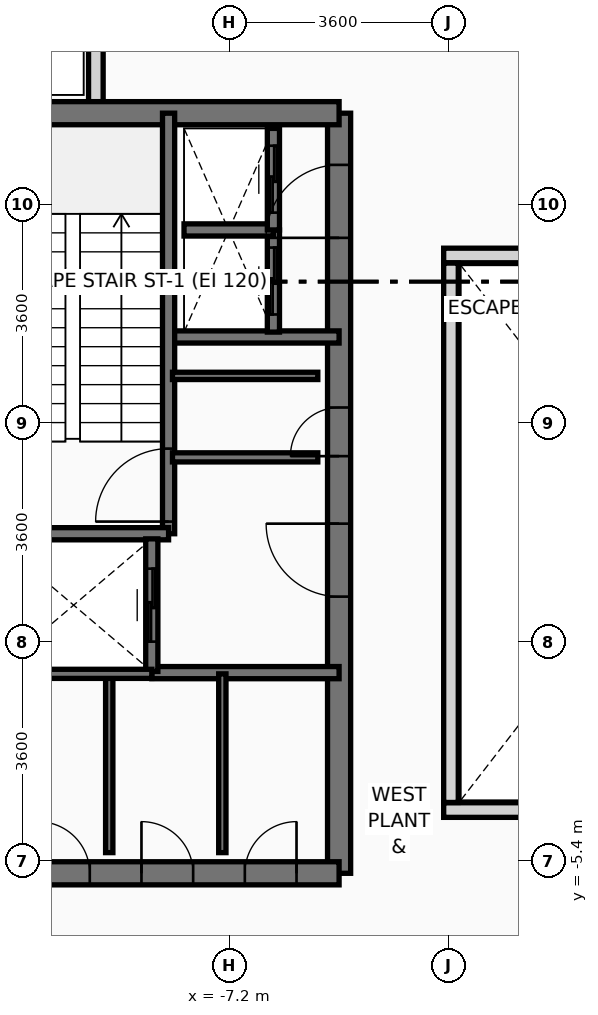
"""IFC4 building model, lengths in metres.
Left out: names, types, materials, properties, quantities, classifications, styles, units other than length and angle.
Written with IfcOpenShell. Run it as: python <this file> out.ifc"""

import sys

from ifc_helpers import new_model, si_unit, direction, frame, frame_2d, origin, place, context, subcontext, project, spatial, rectangle, extrude, source, transform, mapped, element, fill, save


model = new_model("IFC4")
c1 = context("Model", 3, precision=1e-05, world=origin(), true_north=direction((0.0, 1.0)))
c2 = subcontext(c1, "Body", "Model", "MODEL_VIEW")
j1 = project(units=[si_unit("LENGTHUNIT", "METRE"), si_unit("PLANEANGLEUNIT", "RADIAN")], contexts=[c1])
p1 = place(None, origin())
s1 = spatial("IfcSite", under=j1, at=p1, CompositionType="ELEMENT")
p2 = place(p1, origin())
s2 = spatial("IfcBuilding", under=s1, at=p2, CompositionType="ELEMENT")
p3 = place(p2, frame((0.0, 0.0, 214.8)))
s3 = spatial("IfcBuildingStorey", under=s2, at=p3, CompositionType="ELEMENT", Elevation=214.8)
p4 = place(p3, frame((-9.4, 6.953, 0.0), z_axis=(0.0, 0.0, 1.0), x_axis=(0.0, 1.0, 0.0)))
e1 = element("IfcWall", 1, at=p4, inside=s3, PredefinedType="PARAPET", context=c2, shape_type="SweptSolid", body=[
    extrude(rectangle(XDim=1.594, YDim=0.24, at=frame_2d((0.797, 0.0))), origin(), (0.0, 0.0, 1.0), 1.15),
])
p5 = place(p3, frame((-5.4, -5.6, 0.0), z_axis=(0.0, 0.0, 1.0), x_axis=(0.0, 1.0, 0.0)))
e2 = element("IfcWall", 2, at=p5, inside=s3, PredefinedType="SHEAR", context=c2, shape_type="SweptSolid", body=[
    extrude(rectangle(XDim=12.5, YDim=0.38, at=frame_2d((6.25, 0.0))), origin(), (0.0, 0.0, 1.0), 4.41),
])
p6 = place(p5, frame((4.55, 0.0, 0.0)))
e3 = element("IfcOpeningElement", 3, at=p6, cuts=e2, PredefinedType="OPENING", context=c2, shape_type="SweptSolid", body=[
    extrude(rectangle(XDim=1.2, YDim=2.2, at=frame_2d((0.6, 1.1))), frame((0.0, 0.2, 0.0), z_axis=(0.0, -1.0, 0.0), x_axis=(1.0, 0.0, 0.0)), (0.0, 0.0, 1.0), 0.4),
])
p7 = place(p5, frame((10.45, 0.0, 0.0)))
e4 = element("IfcOpeningElement", 4, at=p7, cuts=e2, PredefinedType="OPENING", context=c2, shape_type="SweptSolid", body=[
    extrude(rectangle(XDim=1.2, YDim=2.2, at=frame_2d((0.6, 1.1))), frame((0.0, 0.2, 0.0), z_axis=(0.0, -1.0, 0.0), x_axis=(1.0, 0.0, 0.0)), (0.0, 0.0, 1.0), 0.4),
])
p8 = place(p5, frame((6.86, 0.0, 0.0)))
e5 = element("IfcOpeningElement", 5, at=p8, cuts=e2, PredefinedType="OPENING", context=c2, shape_type="SweptSolid", body=[
    extrude(rectangle(XDim=0.8, YDim=2.1, at=frame_2d((0.4, 1.05))), frame((0.0, 0.2, 0.0), z_axis=(0.0, -1.0, 0.0), x_axis=(1.0, 0.0, 0.0)), (0.0, 0.0, 1.0), 0.4),
])
p9 = place(p3, frame((-11.356, 6.9, 0.0), z_axis=(0.0, 0.0, 1.0), x_axis=(1.0, 0.0, 0.0)))
e6 = element("IfcWall", 6, at=p9, inside=s3, PredefinedType="SHEAR", context=c2, shape_type="SweptSolid", body=[
    extrude(rectangle(XDim=5.956, YDim=0.38, at=frame_2d((2.978, 0.0))), origin(), (0.0, 0.0, 1.0), 4.41),
])
p10 = place(p3, frame((-13.2, -5.6, 0.0), z_axis=(0.0, 0.0, 1.0), x_axis=(1.0, 0.0, 0.0)))
e7 = element("IfcWall", 7, at=p10, inside=s3, PredefinedType="SHEAR", context=c2, shape_type="SweptSolid", body=[
    extrude(rectangle(XDim=7.8, YDim=0.38, at=frame_2d((3.9, 0.0))), origin(), (0.0, 0.0, 1.0), 4.41),
])
p11 = place(p10, frame((0.28, 0.0, 0.0)))
e8 = element("IfcOpeningElement", 8, at=p11, cuts=e7, PredefinedType="OPENING", context=c2, shape_type="SweptSolid", body=[
    extrude(rectangle(XDim=0.85, YDim=2.1, at=frame_2d((0.425, 1.05))), frame((0.0, 0.2, 0.0), z_axis=(0.0, -1.0, 0.0), x_axis=(1.0, 0.0, 0.0)), (0.0, 0.0, 1.0), 0.4),
])
p12 = place(p10, frame((1.36, 0.0, 0.0)))
e9 = element("IfcOpeningElement", 9, at=p12, cuts=e7, PredefinedType="OPENING", context=c2, shape_type="SweptSolid", body=[
    extrude(rectangle(XDim=0.85, YDim=2.1, at=frame_2d((0.425, 1.05))), frame((0.0, 0.2, 0.0), z_axis=(0.0, -1.0, 0.0), x_axis=(1.0, 0.0, 0.0)), (0.0, 0.0, 1.0), 0.4),
])
p13 = place(p10, frame((2.85, 0.0, 0.0)))
e10 = element("IfcOpeningElement", 10, at=p13, cuts=e7, PredefinedType="OPENING", context=c2, shape_type="SweptSolid", body=[
    extrude(rectangle(XDim=0.85, YDim=2.1, at=frame_2d((0.425, 1.05))), frame((0.0, 0.2, 0.0), z_axis=(0.0, -1.0, 0.0), x_axis=(1.0, 0.0, 0.0)), (0.0, 0.0, 1.0), 0.4),
])
p14 = place(p10, frame((4.55, 0.0, 0.0)))
e11 = element("IfcOpeningElement", 11, at=p14, cuts=e7, PredefinedType="OPENING", context=c2, shape_type="SweptSolid", body=[
    extrude(rectangle(XDim=0.85, YDim=2.1, at=frame_2d((0.425, 1.05))), frame((0.0, 0.2, 0.0), z_axis=(0.0, -1.0, 0.0), x_axis=(1.0, 0.0, 0.0)), (0.0, 0.0, 1.0), 0.4),
])
p15 = place(p10, frame((6.25, 0.0, 0.0)))
e12 = element("IfcOpeningElement", 12, at=p15, cuts=e7, PredefinedType="OPENING", context=c2, shape_type="SweptSolid", body=[
    extrude(rectangle(XDim=0.85, YDim=2.1, at=frame_2d((0.425, 1.05))), frame((0.0, 0.2, 0.0), z_axis=(0.0, -1.0, 0.0), x_axis=(1.0, 0.0, 0.0)), (0.0, 0.0, 1.0), 0.4),
])
p16 = place(p3, frame((-8.18, 3.22, 0.0), z_axis=(0.0, 0.0, 1.0), x_axis=(1.0, 0.0, 0.0)))
e13 = element("IfcWall", 13, at=p16, inside=s3, PredefinedType="SOLIDWALL", context=c2, shape_type="SweptSolid", body=[
    extrude(rectangle(XDim=2.78, YDim=0.2, at=frame_2d((1.39, 0.0))), origin(), (0.0, 0.0, 1.0), 4.41),
])
p17 = place(p3, frame((-8.48, -2.3, 0.0), z_axis=(0.0, 0.0, 1.0), x_axis=(1.0, 0.0, 0.0)))
e14 = element("IfcWall", 14, at=p17, inside=s3, PredefinedType="SOLIDWALL", context=c2, shape_type="SweptSolid", body=[
    extrude(rectangle(XDim=3.08, YDim=0.2, at=frame_2d((1.54, 0.0))), origin(), (0.0, 0.0, 1.0), 4.41),
])
p18 = place(p3, frame((-8.204, -0.016, 0.0), z_axis=(0.0, 0.0, 1.0), x_axis=(0.0, 1.0, 0.0)))
e15 = element("IfcWall", 15, at=p18, inside=s3, PredefinedType="SOLIDWALL", context=c2, shape_type="SweptSolid", body=[
    extrude(rectangle(XDim=6.916, YDim=0.2, at=frame_2d((3.458, 0.0))), origin(), (0.0, 0.0, 1.0), 4.41),
])
p19 = place(p18, frame((0.2, 0.0, 0.0)))
e16 = element("IfcOpeningElement", 16, at=p19, cuts=e15, PredefinedType="OPENING", context=c2, shape_type="SweptSolid", body=[
    extrude(rectangle(XDim=1.2, YDim=2.2, at=frame_2d((0.6, 1.1))), frame((0.0, 0.11, 0.0), z_axis=(0.0, -1.0, 0.0), x_axis=(1.0, 0.0, 0.0)), (0.0, 0.0, 1.0), 0.22),
])
p20 = place(p3, frame((-11.356, -0.016, 0.0), z_axis=(0.0, 0.0, 1.0), x_axis=(1.0, 0.0, 0.0)))
e17 = element("IfcWall", 17, at=p20, inside=s3, PredefinedType="SOLIDWALL", context=c2, shape_type="SweptSolid", body=[
    extrude(rectangle(XDim=3.152, YDim=0.2, at=frame_2d((1.576, 0.0))), origin(), (0.0, 0.0, 1.0), 4.41),
])
p21 = place(p3, frame((-8.48, -2.28, 0.0), z_axis=(0.0, 0.0, 1.0), x_axis=(0.0, 1.0, 0.0)))
e18 = element("IfcWall", 18, at=p21, inside=s3, PredefinedType="SOLIDWALL", context=c2, shape_type="SweptSolid", body=[
    extrude(rectangle(XDim=2.18, YDim=0.2, at=frame_2d((1.09, 0.0))), origin(), (0.0, 0.0, 1.0), 4.41),
])
p22 = place(p21, frame((0.49, 0.0, 0.0)))
e19 = element("IfcOpeningElement", 19, at=p22, cuts=e18, PredefinedType="OPENING", context=c2, shape_type="SweptSolid", body=[
    extrude(rectangle(XDim=1.2, YDim=2.2, at=frame_2d((0.6, 1.1))), frame((0.0, 0.11, 0.0), z_axis=(0.0, -1.0, 0.0), x_axis=(1.0, 0.0, 0.0)), (0.0, 0.0, 1.0), 0.22),
])
p23 = place(p3, frame((-6.48, 3.3, 0.0), z_axis=(0.0, 0.0, 1.0), x_axis=(0.0, 1.0, 0.0)))
e20 = element("IfcWall", 20, at=p23, inside=s3, PredefinedType="SOLIDWALL", context=c2, shape_type="SweptSolid", body=[
    extrude(rectangle(XDim=1.68, YDim=0.2, at=frame_2d((0.84, 0.0))), origin(), (0.0, 0.0, 1.0), 4.41),
])
p24 = place(p23, frame((0.29, 0.0, 0.0)))
e21 = element("IfcOpeningElement", 21, at=p24, cuts=e20, PredefinedType="OPENING", context=c2, shape_type="SweptSolid", body=[
    extrude(rectangle(XDim=1.1, YDim=2.2, at=frame_2d((0.55, 1.1))), frame((0.0, 0.11, 0.0), z_axis=(0.0, -1.0, 0.0), x_axis=(1.0, 0.0, 0.0)), (0.0, 0.0, 1.0), 0.22),
])
p25 = place(p3, frame((-7.95, 4.98, 0.0), z_axis=(0.0, 0.0, 1.0), x_axis=(1.0, 0.0, 0.0)))
e22 = element("IfcWall", 22, at=p25, inside=s3, PredefinedType="SOLIDWALL", context=c2, shape_type="SweptSolid", body=[
    extrude(rectangle(XDim=1.47, YDim=0.2, at=frame_2d((0.735, 0.0))), origin(), (0.0, 0.0, 1.0), 4.41),
])
p26 = place(p3, frame((-6.48, 4.98, 0.0), z_axis=(0.0, 0.0, 1.0), x_axis=(0.0, 1.0, 0.0)))
e23 = element("IfcWall", 23, at=p26, inside=s3, PredefinedType="SOLIDWALL", context=c2, shape_type="SweptSolid", body=[
    extrude(rectangle(XDim=1.67, YDim=0.2, at=frame_2d((0.835, 0.0))), origin(), (0.0, 0.0, 1.0), 4.41),
])
p27 = place(p26, frame((0.285, 0.0, 0.0)))
e24 = element("IfcOpeningElement", 24, at=p27, cuts=e23, PredefinedType="OPENING", context=c2, shape_type="SweptSolid", body=[
    extrude(rectangle(XDim=1.1, YDim=2.2, at=frame_2d((0.55, 1.1))), frame((0.0, 0.11, 0.0), z_axis=(0.0, -1.0, 0.0), x_axis=(1.0, 0.0, 0.0)), (0.0, 0.0, 1.0), 0.22),
])
p28 = place(p3, frame((-8.14, 1.24, 0.0), z_axis=(0.0, 0.0, 1.0), x_axis=(1.0, 0.0, 0.0)))
e25 = element("IfcWall", 25, at=p28, inside=s3, PredefinedType="PARTITIONING", context=c2, shape_type="SweptSolid", body=[
    extrude(rectangle(XDim=2.39, YDim=0.15, at=frame_2d((1.195, 0.0))), origin(), (0.0, 0.0, 1.0), 3.51),
])
p29 = place(p3, frame((-8.14, 2.58, 0.0), z_axis=(0.0, 0.0, 1.0), x_axis=(1.0, 0.0, 0.0)))
e26 = element("IfcWall", 26, at=p29, inside=s3, PredefinedType="PARTITIONING", context=c2, shape_type="SweptSolid", body=[
    extrude(rectangle(XDim=2.39, YDim=0.12, at=frame_2d((1.195, 0.0))), origin(), (0.0, 0.0, 1.0), 3.51),
])
for number, where, z_axis, x_axis in (
    (27, (-9.18, -5.26, 0.0), (0.0, 0.0, 1.0), (0.0, 1.0, 0.0)),
    (28, (-7.32, -5.26, 0.0), (0.0, 0.0, 1.0), (0.0, 1.0, 0.0)),
):
    element("IfcWall", number, at=place(p3, frame(where, z_axis=z_axis, x_axis=x_axis)), inside=s3, PredefinedType="PARTITIONING", context=c2, shape_type="SweptSolid", body=[
        extrude(rectangle(XDim=2.94, YDim=0.12, at=frame_2d((1.47, 0.0))), origin(), (0.0, 0.0, 1.0), 4.41),
    ])
p30 = place(p3, frame((-11.04, -2.32, 0.0), z_axis=(0.0, 0.0, 1.0), x_axis=(1.0, 0.0, 0.0)))
e29 = element("IfcWall", 29, at=p30, inside=s3, PredefinedType="PARTITIONING", context=c2, shape_type="SweptSolid", body=[
    extrude(rectangle(XDim=2.56, YDim=0.15, at=frame_2d((1.28, 0.0))), origin(), (0.0, 0.0, 1.0), 4.41),
])
for number, where, z_axis, x_axis in (
    (30, (-3.68, -4.56, 0.0), (0.0, 0.0, 1.0), (1.0, 0.0, 0.0)),
    (31, (-3.68, 4.56, 0.0), (0.0, 0.0, 1.0), (1.0, 0.0, 0.0)),
):
    element("IfcWall", number, at=place(p3, frame(where, z_axis=z_axis, x_axis=x_axis)), inside=s3, PredefinedType="PARAPET", context=c2, shape_type="SweptSolid", body=[
        extrude(rectangle(XDim=7.36, YDim=0.24, at=frame_2d((3.68, 0.0))), origin(), (0.0, 0.0, 1.0), 1.15),
    ])
p31 = place(p3, frame((-3.56, -4.435, 0.0), z_axis=(0.0, 0.0, 1.0), x_axis=(0.0, 1.0, 0.0)))
e32 = element("IfcWall", 32, at=p31, inside=s3, PredefinedType="PARAPET", context=c2, shape_type="SweptSolid", body=[
    extrude(rectangle(XDim=8.87, YDim=0.24, at=frame_2d((4.435, 0.0))), origin(), (0.0, 0.0, 1.0), 1.15),
])
m1 = source(origin(), c2, "Body", "SweptSolid", [
    extrude(rectangle(XDim=1.2, YDim=2.2, at=frame_2d((0.6, 1.1))), frame((0.0, 0.025, 0.0), z_axis=(0.0, -1.0, 0.0), x_axis=(1.0, 0.0, 0.0)), (0.0, 0.0, 1.0), 0.05),
])
p32 = place(p19, origin())
e33 = element("IfcDoor", 33, at=p32, inside=s3, OperationType="SINGLE_SWING_LEFT", PredefinedType="DOOR", context=c2, shape_type="MappedRepresentation", body=[
    mapped(m1, transform((0.0, 0.0, 0.0), x_axis=(1.0, 0.0, 0.0), y_axis=(0.0, 1.0, 0.0), z_axis=(0.0, 0.0, 1.0), scale=1.0)),
])
fill(e16, e33)
p33 = place(p6, origin())
e34 = element("IfcDoor", 34, at=p33, inside=s3, OperationType="SINGLE_SWING_RIGHT", PredefinedType="DOOR", context=c2, shape_type="MappedRepresentation", body=[
    mapped(m1, transform((0.0, 0.0, 0.0), x_axis=(1.0, 0.0, 0.0), y_axis=(0.0, 1.0, 0.0), z_axis=(0.0, 0.0, 1.0), scale=1.0)),
])
fill(e3, e34)
p34 = place(p7, origin())
e35 = element("IfcDoor", 35, at=p34, inside=s3, OperationType="SINGLE_SWING_LEFT", PredefinedType="DOOR", context=c2, shape_type="MappedRepresentation", body=[
    mapped(m1, transform((0.0, 0.0, 0.0), x_axis=(1.0, 0.0, 0.0), y_axis=(0.0, 1.0, 0.0), z_axis=(0.0, 0.0, 1.0), scale=1.0)),
])
fill(e4, e35)
m2 = source(origin(), c2, "Body", "SweptSolid", [
    extrude(rectangle(XDim=0.8, YDim=2.1, at=frame_2d((0.4, 1.05))), frame((0.0, 0.025, 0.0), z_axis=(0.0, -1.0, 0.0), x_axis=(1.0, 0.0, 0.0)), (0.0, 0.0, 1.0), 0.05),
])
p35 = place(p8, origin())
e36 = element("IfcDoor", 36, at=p35, inside=s3, OperationType="SINGLE_SWING_LEFT", PredefinedType="DOOR", context=c2, shape_type="MappedRepresentation", body=[
    mapped(m2, transform((0.0, 0.0, 0.0), x_axis=(1.0, 0.0, 0.0), y_axis=(0.0, 1.0, 0.0), z_axis=(0.0, 0.0, 1.0), scale=1.0)),
])
fill(e5, e36)
m3 = source(origin(), c2, "Body", "SweptSolid", [
    extrude(rectangle(XDim=0.85, YDim=2.1, at=frame_2d((0.425, 1.05))), frame((0.0, 0.025, 0.0), z_axis=(0.0, -1.0, 0.0), x_axis=(1.0, 0.0, 0.0)), (0.0, 0.0, 1.0), 0.05),
])
p36 = place(p13, origin())
e37 = element("IfcDoor", 37, at=p36, inside=s3, OperationType="SINGLE_SWING_LEFT", PredefinedType="DOOR", context=c2, shape_type="MappedRepresentation", body=[
    mapped(m3, transform((0.0, 0.0, 0.0), x_axis=(1.0, 0.0, 0.0), y_axis=(0.0, 1.0, 0.0), z_axis=(0.0, 0.0, 1.0), scale=1.0)),
])
fill(e10, e37)
p37 = place(p14, origin())
e38 = element("IfcDoor", 38, at=p37, inside=s3, OperationType="SINGLE_SWING_LEFT", PredefinedType="DOOR", context=c2, shape_type="MappedRepresentation", body=[
    mapped(m3, transform((0.0, 0.0, 0.0), x_axis=(1.0, 0.0, 0.0), y_axis=(0.0, 1.0, 0.0), z_axis=(0.0, 0.0, 1.0), scale=1.0)),
])
fill(e11, e38)
p38 = place(p15, origin())
e39 = element("IfcDoor", 39, at=p38, inside=s3, OperationType="SINGLE_SWING_RIGHT", PredefinedType="DOOR", context=c2, shape_type="MappedRepresentation", body=[
    mapped(m3, transform((0.0, 0.0, 0.0), x_axis=(1.0, 0.0, 0.0), y_axis=(0.0, 1.0, 0.0), z_axis=(0.0, 0.0, 1.0), scale=1.0)),
])
fill(e12, e39)
p39 = place(p22, origin())
e40 = element("IfcDoor", 40, at=p39, inside=s3, OperationType="SLIDING_TO_RIGHT", PredefinedType="DOOR", context=c2, shape_type="MappedRepresentation", body=[
    mapped(m1, transform((0.0, 0.0, 0.0), x_axis=(1.0, 0.0, 0.0), y_axis=(0.0, 1.0, 0.0), z_axis=(0.0, 0.0, 1.0), scale=1.0)),
])
fill(e19, e40)
m4 = source(origin(), c2, "Body", "SweptSolid", [
    extrude(rectangle(XDim=1.1, YDim=2.2, at=frame_2d((0.55, 1.1))), frame((0.0, 0.025, 0.0), z_axis=(0.0, -1.0, 0.0), x_axis=(1.0, 0.0, 0.0)), (0.0, 0.0, 1.0), 0.05),
])
p40 = place(p24, origin())
e41 = element("IfcDoor", 41, at=p40, inside=s3, OperationType="SLIDING_TO_LEFT", PredefinedType="DOOR", context=c2, shape_type="MappedRepresentation", body=[
    mapped(m4, transform((0.0, 0.0, 0.0), x_axis=(1.0, 0.0, 0.0), y_axis=(0.0, 1.0, 0.0), z_axis=(0.0, 0.0, 1.0), scale=1.0)),
])
fill(e21, e41)
p41 = place(p27, origin())
e42 = element("IfcDoor", 42, at=p41, inside=s3, OperationType="SLIDING_TO_LEFT", PredefinedType="DOOR", context=c2, shape_type="MappedRepresentation", body=[
    mapped(m4, transform((0.0, 0.0, 0.0), x_axis=(1.0, 0.0, 0.0), y_axis=(0.0, 1.0, 0.0), z_axis=(0.0, 0.0, 1.0), scale=1.0)),
])
fill(e24, e42)
save(model, sys.argv[1])
